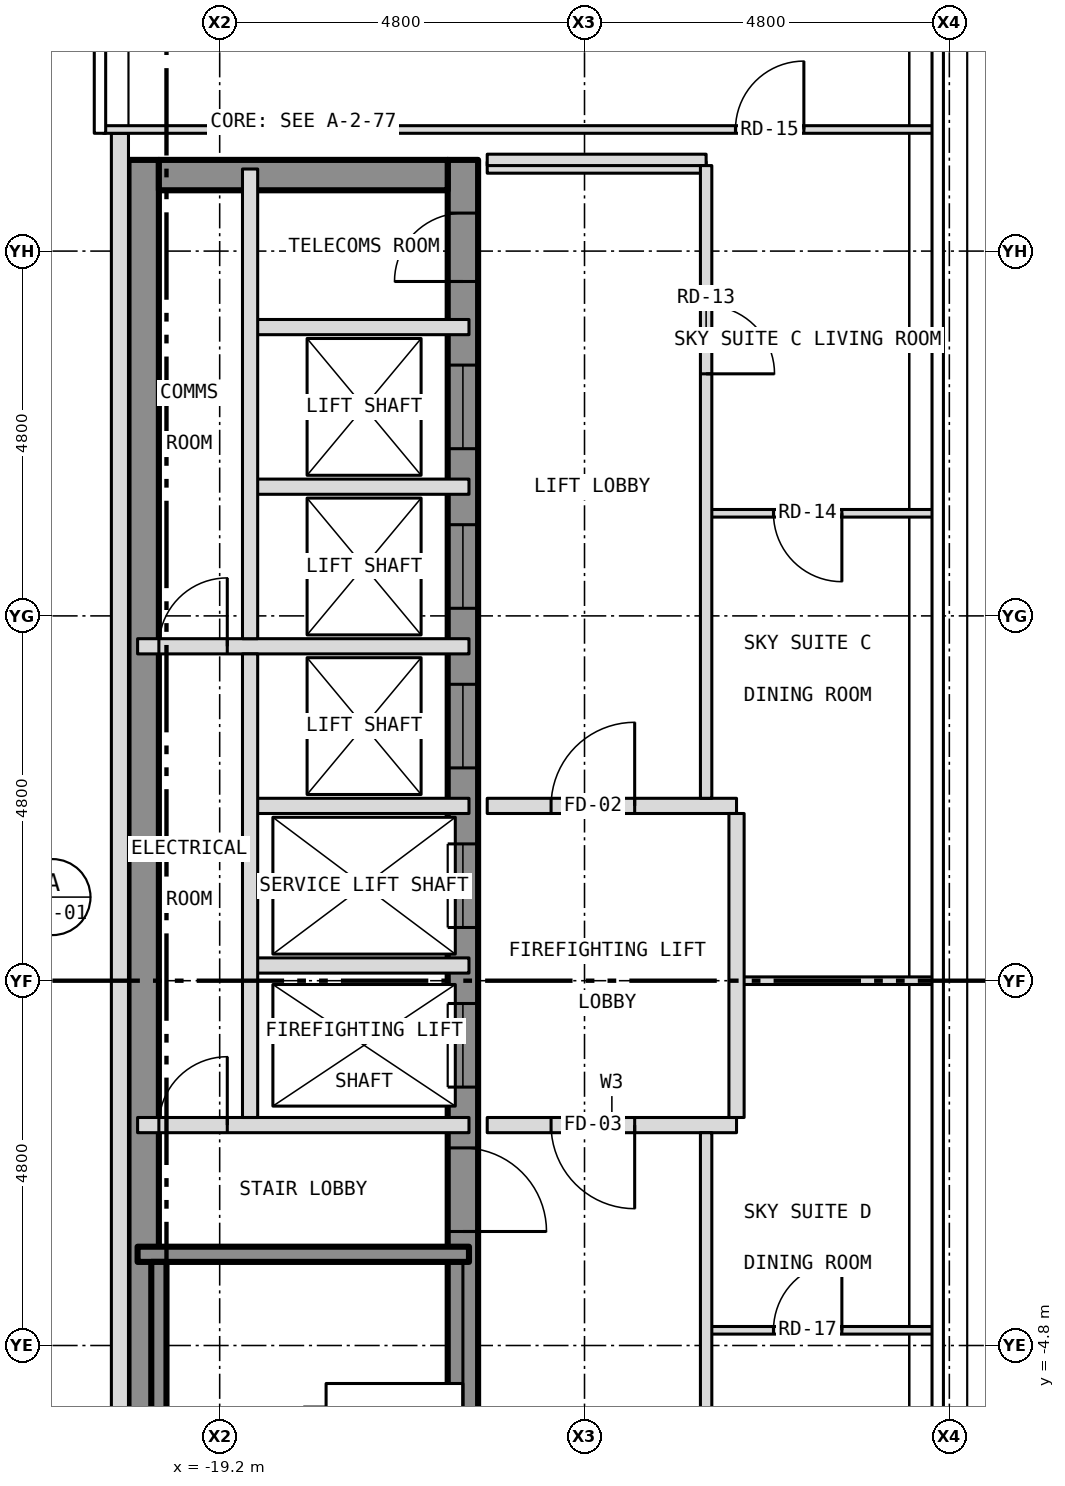
"""IFC4 building model, lengths in metres.
Left out: names, types, materials, properties, quantities, classifications, styles, units other than length and angle.
Written with IfcOpenShell. Run it as: python <this file> out.ifc"""

import sys

from ifc_helpers import new_model, si_unit, direction, frame, frame_2d, origin, place, context, subcontext, project, spatial, rectangle, extrude, element, fill, save


model = new_model("IFC4")
c1 = context("Model", 3, precision=1e-05, world=origin(), true_north=direction((0.0, 1.0)))
c2 = subcontext(c1, "Body", "Model", "MODEL_VIEW")
j1 = project(units=[si_unit("LENGTHUNIT", "METRE"), si_unit("PLANEANGLEUNIT", "RADIAN")], contexts=[c1])
p1 = place(None, origin())
s1 = spatial("IfcSite", under=j1, at=p1, CompositionType="ELEMENT")
p2 = place(p1, origin())
s2 = spatial("IfcBuilding", under=s1, at=p2, CompositionType="ELEMENT")
p3 = place(p2, frame((0.0, 0.0, 279.5)))
s3 = spatial("IfcBuildingStorey", under=s2, at=p3, CompositionType="ELEMENT", Elevation=279.5)
p4 = place(p3, frame((-16.0, -10.8, 0.0), z_axis=(0.0, 0.0, 1.0), x_axis=(0.0, 1.0, 0.0)))
e1 = element("IfcWall", 1, at=p4, inside=s3, PredefinedType="SHEAR", context=c2, shape_type="SweptSolid", body=[
    extrude(rectangle(XDim=21.6, YDim=0.4, at=frame_2d((10.8, 0.0))), origin(), (0.0, 0.0, 1.0), 3.25),
])
p5 = place(p4, frame((9.4, 0.0, 0.0)))
e2 = element("IfcOpeningElement", 2, at=p5, cuts=e1, PredefinedType="OPENING", context=c2, shape_type="SweptSolid", body=[
    extrude(rectangle(XDim=1.1, YDim=2.1, at=frame_2d((0.55, 1.05))), frame((0.0, 0.212, 0.0), z_axis=(0.0, -1.0, 0.0), x_axis=(1.0, 0.0, 0.0)), (0.0, 0.0, 1.0), 0.424),
])
p6 = place(p4, frame((11.5, 0.0, 0.0)))
e3 = element("IfcOpeningElement", 3, at=p6, cuts=e1, PredefinedType="OPENING", context=c2, shape_type="SweptSolid", body=[
    extrude(rectangle(XDim=1.1, YDim=2.1, at=frame_2d((0.55, 1.05))), frame((0.0, 0.212, 0.0), z_axis=(0.0, -1.0, 0.0), x_axis=(1.0, 0.0, 0.0)), (0.0, 0.0, 1.0), 0.424),
])
p7 = place(p4, frame((13.6, 0.0, 0.0)))
e4 = element("IfcOpeningElement", 4, at=p7, cuts=e1, PredefinedType="OPENING", context=c2, shape_type="SweptSolid", body=[
    extrude(rectangle(XDim=1.1, YDim=2.1, at=frame_2d((0.55, 1.05))), frame((0.0, 0.212, 0.0), z_axis=(0.0, -1.0, 0.0), x_axis=(1.0, 0.0, 0.0)), (0.0, 0.0, 1.0), 0.424),
])
p8 = place(p4, frame((15.7, 0.0, 0.0)))
e5 = element("IfcOpeningElement", 5, at=p8, cuts=e1, PredefinedType="OPENING", context=c2, shape_type="SweptSolid", body=[
    extrude(rectangle(XDim=1.1, YDim=2.1, at=frame_2d((0.55, 1.05))), frame((0.0, 0.212, 0.0), z_axis=(0.0, -1.0, 0.0), x_axis=(1.0, 0.0, 0.0)), (0.0, 0.0, 1.0), 0.424),
])
p9 = place(p4, frame((17.8, 0.0, 0.0)))
e6 = element("IfcOpeningElement", 6, at=p9, cuts=e1, PredefinedType="OPENING", context=c2, shape_type="SweptSolid", body=[
    extrude(rectangle(XDim=1.1, YDim=2.1, at=frame_2d((0.55, 1.05))), frame((0.0, 0.212, 0.0), z_axis=(0.0, -1.0, 0.0), x_axis=(1.0, 0.0, 0.0)), (0.0, 0.0, 1.0), 0.424),
])
p10 = place(p4, frame((0.458, 0.0, 0.0)))
e7 = element("IfcOpeningElement", 7, at=p10, cuts=e1, PredefinedType="OPENING", context=c2, shape_type="SweptSolid", body=[
    extrude(rectangle(XDim=1.1, YDim=2.1, at=frame_2d((0.55, 1.05))), frame((0.0, 0.212, 0.0), z_axis=(0.0, -1.0, 0.0), x_axis=(1.0, 0.0, 0.0)), (0.0, 0.0, 1.0), 0.424),
])
p11 = place(p4, frame((7.5, 0.0, 0.0)))
e8 = element("IfcOpeningElement", 8, at=p11, cuts=e1, PredefinedType="OPENING", context=c2, shape_type="SweptSolid", body=[
    extrude(rectangle(XDim=1.1, YDim=2.1, at=frame_2d((0.55, 1.05))), frame((0.0, 0.212, 0.0), z_axis=(0.0, -1.0, 0.0), x_axis=(1.0, 0.0, 0.0)), (0.0, 0.0, 1.0), 0.424),
])
p12 = place(p4, frame((20.0, 0.0, 0.0)))
e9 = element("IfcOpeningElement", 9, at=p12, cuts=e1, PredefinedType="OPENING", context=c2, shape_type="SweptSolid", body=[
    extrude(rectangle(XDim=0.9, YDim=2.1, at=frame_2d((0.45, 1.05))), frame((0.0, 0.212, 0.0), z_axis=(0.0, -1.0, 0.0), x_axis=(1.0, 0.0, 0.0)), (0.0, 0.0, 1.0), 0.424),
])
p13 = place(p3, frame((-20.2, -10.8, 0.0), z_axis=(0.0, 0.0, 1.0), x_axis=(0.0, 1.0, 0.0)))
e10 = element("IfcWall", 10, at=p13, inside=s3, PredefinedType="SHEAR", context=c2, shape_type="SweptSolid", body=[
    extrude(rectangle(XDim=21.6, YDim=0.4, at=frame_2d((10.8, 0.0))), origin(), (0.0, 0.0, 1.0), 3.25),
])
p14 = place(p3, frame((-20.0, 10.6, 0.0), z_axis=(0.0, 0.0, 1.0), x_axis=(1.0, 0.0, 0.0)))
e11 = element("IfcWall", 11, at=p14, inside=s3, PredefinedType="SHEAR", context=c2, shape_type="SweptSolid", body=[
    extrude(rectangle(XDim=3.8, YDim=0.4, at=frame_2d((1.9, 0.0))), origin(), (0.0, 0.0, 1.0), 3.25),
])
p15 = place(p3, frame((-20.512, 11.15, 0.0), z_axis=(0.0, 0.0, 1.0), x_axis=(0.0, -1.0, 0.0)))
e12 = element("IfcWall", 12, at=p15, inside=s3, PredefinedType="SOLIDWALL", context=c2, shape_type="SweptSolid", body=[
    extrude(rectangle(XDim=22.3, YDim=0.225, at=frame_2d((11.15, 0.0))), origin(), (0.0, 0.0, 1.0), 3.5),
])
p16 = place(p15, frame((18.4, 0.0, 1.0)))
e13 = element("IfcOpeningElement", 13, at=p16, cuts=e12, PredefinedType="OPENING", context=c2, shape_type="SweptSolid", body=[
    extrude(rectangle(XDim=0.6, YDim=1.5, at=frame_2d((0.3, 0.75))), frame((0.0, 0.125, 0.0), z_axis=(0.0, -1.0, 0.0), x_axis=(1.0, 0.0, 0.0)), (0.0, 0.0, 1.0), 0.249),
])
p17 = place(p3, frame((-12.8, -4.6, 0.0), z_axis=(0.0, 0.0, 1.0), x_axis=(1.0, 0.0, 0.0)))
e14 = element("IfcWall", 14, at=p17, inside=s3, PredefinedType="PARTITIONING", context=c2, shape_type="SweptSolid", body=[
    extrude(rectangle(XDim=3.002, YDim=0.1, at=frame_2d((1.501, 0.0))), origin(), (0.0, 0.0, 1.0), 3.35),
])
p18 = place(p17, frame((0.886, 0.0, 0.0)))
e15 = element("IfcOpeningElement", 15, at=p18, cuts=e14, PredefinedType="OPENING", context=c2, shape_type="SweptSolid", body=[
    extrude(rectangle(XDim=0.9, YDim=2.1, at=frame_2d((0.45, 1.05))), frame((0.0, 0.062, 0.0), z_axis=(0.0, -1.0, 0.0), x_axis=(1.0, 0.0, 0.0)), (0.0, 0.0, 1.0), 0.124),
])
p19 = place(p3, frame((-20.28, -3.6, 0.0), z_axis=(0.0, 0.0, 1.0), x_axis=(1.0, 0.0, 0.0)))
e16 = element("IfcWall", 16, at=p19, inside=s3, PredefinedType="SHEAR", context=c2, shape_type="SweptSolid", body=[
    extrude(rectangle(XDim=4.36, YDim=0.2, at=frame_2d((2.18, 0.0))), origin(), (0.0, 0.0, 1.0), 3.25),
])
p20 = place(p3, frame((-20.28, -1.9, 0.0), z_axis=(0.0, 0.0, 1.0), x_axis=(1.0, 0.0, 0.0)))
e17 = element("IfcWall", 17, at=p20, inside=s3, PredefinedType="PARTITIONING", context=c2, shape_type="SweptSolid", body=[
    extrude(rectangle(XDim=4.36, YDim=0.2, at=frame_2d((2.18, 0.0))), origin(), (0.0, 0.0, 1.0), 3.25),
])
p21 = place(p20, frame((0.28, 0.0, 0.0)))
e18 = element("IfcOpeningElement", 18, at=p21, cuts=e17, PredefinedType="OPENING", context=c2, shape_type="SweptSolid", body=[
    extrude(rectangle(XDim=0.9, YDim=2.1, at=frame_2d((0.45, 1.05))), frame((0.0, 0.112, 0.0), z_axis=(0.0, -1.0, 0.0), x_axis=(1.0, 0.0, 0.0)), (0.0, 0.0, 1.0), 0.224),
])
p22 = place(p3, frame((-15.68, -1.9, 0.0), z_axis=(0.0, 0.0, 1.0), x_axis=(1.0, 0.0, 0.0)))
e19 = element("IfcWall", 19, at=p22, inside=s3, PredefinedType="PARTITIONING", context=c2, shape_type="SweptSolid", body=[
    extrude(rectangle(XDim=3.28, YDim=0.2, at=frame_2d((1.64, 0.0))), origin(), (0.0, 0.0, 1.0), 3.35),
])
p23 = place(p22, frame((0.84, 0.0, 0.0)))
e20 = element("IfcOpeningElement", 20, at=p23, cuts=e19, PredefinedType="OPENING", context=c2, shape_type="SweptSolid", body=[
    extrude(rectangle(XDim=1.1, YDim=2.1, at=frame_2d((0.55, 1.05))), frame((0.0, 0.112, 0.0), z_axis=(0.0, -1.0, 0.0), x_axis=(1.0, 0.0, 0.0)), (0.0, 0.0, 1.0), 0.224),
])
p24 = place(p3, frame((-12.4, 0.0, 0.0), z_axis=(0.0, 0.0, 1.0), x_axis=(1.0, 0.0, 0.0)))
e21 = element("IfcWall", 21, at=p24, inside=s3, PredefinedType="PARTITIONING", context=c2, shape_type="SweptSolid", body=[
    extrude(rectangle(XDim=2.602, YDim=0.1, at=frame_2d((1.301, 0.0))), origin(), (0.0, 0.0, 1.0), 2.728),
])
for number, where, z_axis, x_axis in (
    (22, (-18.8, 0.2, 0.0), (0.0, 0.0, 1.0), (1.0, 0.0, 0.0)),
    (23, (-18.8, 2.3, 0.0), (0.0, 0.0, 1.0), (1.0, 0.0, 0.0)),
):
    element("IfcWall", number, at=place(p3, frame(where, z_axis=z_axis, x_axis=x_axis)), inside=s3, PredefinedType="PARTITIONING", context=c2, shape_type="SweptSolid", body=[
        extrude(rectangle(XDim=2.88, YDim=0.2, at=frame_2d((1.44, 0.0))), origin(), (0.0, 0.0, 1.0), 3.25),
    ])
p25 = place(p3, frame((-15.68, 2.3, 0.0), z_axis=(0.0, 0.0, 1.0), x_axis=(1.0, 0.0, 0.0)))
e24 = element("IfcWall", 24, at=p25, inside=s3, PredefinedType="PARTITIONING", context=c2, shape_type="SweptSolid", body=[
    extrude(rectangle(XDim=3.28, YDim=0.2, at=frame_2d((1.64, 0.0))), origin(), (0.0, 0.0, 1.0), 3.35),
])
p26 = place(p25, frame((0.84, 0.0, 0.0)))
e25 = element("IfcOpeningElement", 25, at=p26, cuts=e24, PredefinedType="OPENING", context=c2, shape_type="SweptSolid", body=[
    extrude(rectangle(XDim=1.1, YDim=2.1, at=frame_2d((0.55, 1.05))), frame((0.0, 0.112, 0.0), z_axis=(0.0, -1.0, 0.0), x_axis=(1.0, 0.0, 0.0)), (0.0, 0.0, 1.0), 0.224),
])
p27 = place(p3, frame((-20.28, 4.4, 0.0), z_axis=(0.0, 0.0, 1.0), x_axis=(1.0, 0.0, 0.0)))
e26 = element("IfcWall", 26, at=p27, inside=s3, PredefinedType="PARTITIONING", context=c2, shape_type="SweptSolid", body=[
    extrude(rectangle(XDim=4.36, YDim=0.2, at=frame_2d((2.18, 0.0))), origin(), (0.0, 0.0, 1.0), 3.25),
])
p28 = place(p27, frame((0.28, 0.0, 0.0)))
e27 = element("IfcOpeningElement", 27, at=p28, cuts=e26, PredefinedType="OPENING", context=c2, shape_type="SweptSolid", body=[
    extrude(rectangle(XDim=0.9, YDim=2.1, at=frame_2d((0.45, 1.05))), frame((0.0, 0.112, 0.0), z_axis=(0.0, -1.0, 0.0), x_axis=(1.0, 0.0, 0.0)), (0.0, 0.0, 1.0), 0.224),
])
p29 = place(p3, frame((-12.8, 6.15, 0.0), z_axis=(0.0, 0.0, 1.0), x_axis=(1.0, 0.0, 0.0)))
e28 = element("IfcWall", 28, at=p29, inside=s3, PredefinedType="PARTITIONING", context=c2, shape_type="SweptSolid", body=[
    extrude(rectangle(XDim=3.002, YDim=0.1, at=frame_2d((1.501, 0.0))), origin(), (0.0, 0.0, 1.0), 3.35),
])
p30 = place(p29, frame((0.886, 0.0, 0.0)))
e29 = element("IfcOpeningElement", 29, at=p30, cuts=e28, PredefinedType="OPENING", context=c2, shape_type="SweptSolid", body=[
    extrude(rectangle(XDim=0.9, YDim=2.1, at=frame_2d((0.45, 1.05))), frame((0.0, 0.062, 0.0), z_axis=(0.0, -1.0, 0.0), x_axis=(1.0, 0.0, 0.0)), (0.0, 0.0, 1.0), 0.124),
])
for number, where, z_axis, x_axis in (
    (30, (-18.8, 6.5, 0.0), (0.0, 0.0, 1.0), (1.0, 0.0, 0.0)),
    (31, (-18.8, 8.6, 0.0), (0.0, 0.0, 1.0), (1.0, 0.0, 0.0)),
):
    element("IfcWall", number, at=place(p3, frame(where, z_axis=z_axis, x_axis=x_axis)), inside=s3, PredefinedType="PARTITIONING", context=c2, shape_type="SweptSolid", body=[
        extrude(rectangle(XDim=2.88, YDim=0.2, at=frame_2d((1.44, 0.0))), origin(), (0.0, 0.0, 1.0), 3.25),
    ])
for number, where, z_axis, x_axis in (
    (32, (-15.68, 10.7, 0.0), (0.0, 0.0, 1.0), (1.0, 0.0, 0.0)),
    (33, (-15.68, 10.8, 0.0), (0.0, 0.0, 1.0), (1.0, 0.0, 0.0)),
):
    element("IfcWall", number, at=place(p3, frame(where, z_axis=z_axis, x_axis=x_axis)), inside=s3, PredefinedType="PARTITIONING", context=c2, shape_type="SweptSolid", body=[
        extrude(rectangle(XDim=2.88, YDim=0.15, at=frame_2d((1.44, 0.0))), origin(), (0.0, 0.0, 1.0), 3.35),
    ])
p31 = place(p3, frame((-20.73, 11.2, 0.0), z_axis=(0.0, 0.0, 1.0), x_axis=(1.0, 0.0, 0.0)))
e34 = element("IfcWall", 34, at=p31, inside=s3, PredefinedType="PARTITIONING", context=c2, shape_type="SweptSolid", body=[
    extrude(rectangle(XDim=10.932, YDim=0.1, at=frame_2d((5.466, 0.0))), origin(), (0.0, 0.0, 1.0), 3.35),
])
p32 = place(p31, frame((8.316, 0.0, 0.0)))
e35 = element("IfcOpeningElement", 35, at=p32, cuts=e34, PredefinedType="OPENING", context=c2, shape_type="SweptSolid", body=[
    extrude(rectangle(XDim=0.9, YDim=2.1, at=frame_2d((0.45, 1.05))), frame((0.0, 0.062, 0.0), z_axis=(0.0, -1.0, 0.0), x_axis=(1.0, 0.0, 0.0)), (0.0, 0.0, 1.0), 0.124),
])
p33 = place(p3, frame((-20.0, -10.68, 0.0), z_axis=(0.0, 0.0, 1.0), x_axis=(0.0, 1.0, 0.0)))
e36 = element("IfcWall", 36, at=p33, inside=s3, PredefinedType="SHEAR", context=c2, shape_type="SweptSolid", body=[
    extrude(rectangle(XDim=6.98, YDim=0.2, at=frame_2d((3.49, 0.0))), origin(), (0.0, 0.0, 1.0), 3.25),
])
p34 = place(p3, frame((-18.8, -1.8, 0.0), z_axis=(0.0, 0.0, 1.0), x_axis=(0.0, 1.0, 0.0)))
e37 = element("IfcWall", 37, at=p34, inside=s3, PredefinedType="PARTITIONING", context=c2, shape_type="SweptSolid", body=[
    extrude(rectangle(XDim=6.1, YDim=0.2, at=frame_2d((3.05, 0.0))), origin(), (0.0, 0.0, 1.0), 3.25),
])
p35 = place(p3, frame((-18.8, 4.5, 0.0), z_axis=(0.0, 0.0, 1.0), x_axis=(0.0, 1.0, 0.0)))
e38 = element("IfcWall", 38, at=p35, inside=s3, PredefinedType="PARTITIONING", context=c2, shape_type="SweptSolid", body=[
    extrude(rectangle(XDim=6.18, YDim=0.2, at=frame_2d((3.09, 0.0))), origin(), (0.0, 0.0, 1.0), 3.25),
])
p36 = place(p3, frame((-12.8, -10.725, 0.0), z_axis=(0.0, 0.0, 1.0), x_axis=(0.0, 1.0, 0.0)))
e39 = element("IfcWall", 39, at=p36, inside=s3, PredefinedType="PARTITIONING", context=c2, shape_type="SweptSolid", body=[
    extrude(rectangle(XDim=8.725, YDim=0.15, at=frame_2d((4.363, 0.0))), origin(), (0.0, 0.0, 1.0), 3.35),
])
p37 = place(p36, frame((2.88, 0.0, 0.0)))
e40 = element("IfcOpeningElement", 40, at=p37, cuts=e39, PredefinedType="OPENING", context=c2, shape_type="SweptSolid", body=[
    extrude(rectangle(XDim=0.9, YDim=2.1, at=frame_2d((0.45, 1.05))), frame((0.0, 0.087, 0.0), z_axis=(0.0, -1.0, 0.0), x_axis=(1.0, 0.0, 0.0)), (0.0, 0.0, 1.0), 0.174),
])
p38 = place(p3, frame((-12.8, 2.4, 0.0), z_axis=(0.0, 0.0, 1.0), x_axis=(0.0, 1.0, 0.0)))
e41 = element("IfcWall", 41, at=p38, inside=s3, PredefinedType="PARTITIONING", context=c2, shape_type="SweptSolid", body=[
    extrude(rectangle(XDim=8.325, YDim=0.15, at=frame_2d((4.163, 0.0))), origin(), (0.0, 0.0, 1.0), 3.35),
])
p39 = place(p38, frame((5.585, 0.0, 0.0)))
e42 = element("IfcOpeningElement", 42, at=p39, cuts=e41, PredefinedType="OPENING", context=c2, shape_type="SweptSolid", body=[
    extrude(rectangle(XDim=0.9, YDim=2.1, at=frame_2d((0.45, 1.05))), frame((0.0, 0.087, 0.0), z_axis=(0.0, -1.0, 0.0), x_axis=(1.0, 0.0, 0.0)), (0.0, 0.0, 1.0), 0.174),
])
p40 = place(p3, frame((-12.4, -1.8, 0.0), z_axis=(0.0, 0.0, 1.0), x_axis=(0.0, 1.0, 0.0)))
e43 = element("IfcWall", 43, at=p40, inside=s3, PredefinedType="PARTITIONING", context=c2, shape_type="SweptSolid", body=[
    extrude(rectangle(XDim=4.0, YDim=0.2, at=frame_2d((2.0, 0.0))), origin(), (0.0, 0.0, 1.0), 3.35),
])
p41 = place(p5, origin())
e44 = element("IfcDoor", 44, at=p41, inside=s3, OperationType="SLIDING_TO_LEFT", PredefinedType="DOOR", context=c2, shape_type="SweptSolid", body=[
    extrude(rectangle(XDim=1.1, YDim=2.1, at=frame_2d((0.55, 1.05))), frame((0.0, 0.025, 0.0), z_axis=(0.0, -1.0, 0.0), x_axis=(1.0, 0.0, 0.0)), (0.0, 0.0, 1.0), 0.05),
])
fill(e2, e44)
p42 = place(p6, origin())
e45 = element("IfcDoor", 45, at=p42, inside=s3, OperationType="SLIDING_TO_LEFT", PredefinedType="DOOR", context=c2, shape_type="SweptSolid", body=[
    extrude(rectangle(XDim=1.1, YDim=2.1, at=frame_2d((0.55, 1.05))), frame((0.0, 0.025, 0.0), z_axis=(0.0, -1.0, 0.0), x_axis=(1.0, 0.0, 0.0)), (0.0, 0.0, 1.0), 0.05),
])
fill(e3, e45)
p43 = place(p7, origin())
e46 = element("IfcDoor", 46, at=p43, inside=s3, OperationType="SLIDING_TO_LEFT", PredefinedType="DOOR", context=c2, shape_type="SweptSolid", body=[
    extrude(rectangle(XDim=1.1, YDim=2.1, at=frame_2d((0.55, 1.05))), frame((0.0, 0.025, 0.0), z_axis=(0.0, -1.0, 0.0), x_axis=(1.0, 0.0, 0.0)), (0.0, 0.0, 1.0), 0.05),
])
fill(e4, e46)
p44 = place(p8, origin())
e47 = element("IfcDoor", 47, at=p44, inside=s3, OperationType="SLIDING_TO_LEFT", PredefinedType="DOOR", context=c2, shape_type="SweptSolid", body=[
    extrude(rectangle(XDim=1.1, YDim=2.1, at=frame_2d((0.55, 1.05))), frame((0.0, 0.025, 0.0), z_axis=(0.0, -1.0, 0.0), x_axis=(1.0, 0.0, 0.0)), (0.0, 0.0, 1.0), 0.05),
])
fill(e5, e47)
p45 = place(p9, origin())
e48 = element("IfcDoor", 48, at=p45, inside=s3, OperationType="SLIDING_TO_LEFT", PredefinedType="DOOR", context=c2, shape_type="SweptSolid", body=[
    extrude(rectangle(XDim=1.1, YDim=2.1, at=frame_2d((0.55, 1.05))), frame((0.0, 0.025, 0.0), z_axis=(0.0, -1.0, 0.0), x_axis=(1.0, 0.0, 0.0)), (0.0, 0.0, 1.0), 0.05),
])
fill(e6, e48)
p46 = place(p11, origin())
e49 = element("IfcDoor", 49, at=p46, inside=s3, OperationType="SINGLE_SWING_LEFT", PredefinedType="DOOR", context=c2, shape_type="SweptSolid", body=[
    extrude(rectangle(XDim=1.1, YDim=2.1, at=frame_2d((0.55, 1.05))), frame((0.0, 0.025, 0.0), z_axis=(0.0, -1.0, 0.0), x_axis=(1.0, 0.0, 0.0)), (0.0, 0.0, 1.0), 0.05),
])
fill(e8, e49)
p47 = place(p12, origin())
e50 = element("IfcDoor", 50, at=p47, inside=s3, OperationType="SINGLE_SWING_LEFT", PredefinedType="DOOR", context=c2, shape_type="SweptSolid", body=[
    extrude(rectangle(XDim=0.9, YDim=2.1, at=frame_2d((0.45, 1.05))), frame((0.0, 0.025, 0.0), z_axis=(0.0, -1.0, 0.0), x_axis=(1.0, 0.0, 0.0)), (0.0, 0.0, 1.0), 0.05),
])
fill(e9, e50)
p48 = place(p21, origin())
e51 = element("IfcDoor", 51, at=p48, inside=s3, OperationType="SINGLE_SWING_RIGHT", PredefinedType="DOOR", context=c2, shape_type="SweptSolid", body=[
    extrude(rectangle(XDim=0.9, YDim=2.1, at=frame_2d((0.45, 1.05))), frame((0.0, 0.025, 0.0), z_axis=(0.0, -1.0, 0.0), x_axis=(1.0, 0.0, 0.0)), (0.0, 0.0, 1.0), 0.05),
])
fill(e18, e51)
p49 = place(p28, origin())
e52 = element("IfcDoor", 52, at=p49, inside=s3, OperationType="SINGLE_SWING_RIGHT", PredefinedType="DOOR", context=c2, shape_type="SweptSolid", body=[
    extrude(rectangle(XDim=0.9, YDim=2.1, at=frame_2d((0.45, 1.05))), frame((0.0, 0.025, 0.0), z_axis=(0.0, -1.0, 0.0), x_axis=(1.0, 0.0, 0.0)), (0.0, 0.0, 1.0), 0.05),
])
fill(e27, e52)
p50 = place(p26, origin())
e53 = element("IfcDoor", 53, at=p50, inside=s3, OperationType="SINGLE_SWING_RIGHT", PredefinedType="DOOR", context=c2, shape_type="SweptSolid", body=[
    extrude(rectangle(XDim=1.1, YDim=2.1, at=frame_2d((0.55, 1.05))), frame((0.0, 0.025, 0.0), z_axis=(0.0, -1.0, 0.0), x_axis=(1.0, 0.0, 0.0)), (0.0, 0.0, 1.0), 0.05),
])
fill(e25, e53)
p51 = place(p23, origin())
e54 = element("IfcDoor", 54, at=p51, inside=s3, OperationType="SINGLE_SWING_RIGHT", PredefinedType="DOOR", context=c2, shape_type="SweptSolid", body=[
    extrude(rectangle(XDim=1.1, YDim=2.1, at=frame_2d((0.55, 1.05))), frame((0.0, 0.025, 0.0), z_axis=(0.0, -1.0, 0.0), x_axis=(1.0, 0.0, 0.0)), (0.0, 0.0, 1.0), 0.05),
])
fill(e20, e54)
p52 = place(p39, origin())
e55 = element("IfcDoor", 55, at=p52, inside=s3, OperationType="SINGLE_SWING_LEFT", PredefinedType="DOOR", context=c2, shape_type="SweptSolid", body=[
    extrude(rectangle(XDim=0.9, YDim=2.1, at=frame_2d((0.45, 1.05))), frame((0.0, 0.025, 0.0), z_axis=(0.0, -1.0, 0.0), x_axis=(1.0, 0.0, 0.0)), (0.0, 0.0, 1.0), 0.05),
])
fill(e42, e55)
p53 = place(p30, origin())
e56 = element("IfcDoor", 56, at=p53, inside=s3, OperationType="SINGLE_SWING_RIGHT", PredefinedType="DOOR", context=c2, shape_type="SweptSolid", body=[
    extrude(rectangle(XDim=0.9, YDim=2.1, at=frame_2d((0.45, 1.05))), frame((0.0, 0.025, 0.0), z_axis=(0.0, -1.0, 0.0), x_axis=(1.0, 0.0, 0.0)), (0.0, 0.0, 1.0), 0.05),
])
fill(e29, e56)
p54 = place(p32, origin())
e57 = element("IfcDoor", 57, at=p54, inside=s3, OperationType="SINGLE_SWING_RIGHT", PredefinedType="DOOR", context=c2, shape_type="SweptSolid", body=[
    extrude(rectangle(XDim=0.9, YDim=2.1, at=frame_2d((0.45, 1.05))), frame((0.0, 0.025, 0.0), z_axis=(0.0, -1.0, 0.0), x_axis=(1.0, 0.0, 0.0)), (0.0, 0.0, 1.0), 0.05),
])
fill(e35, e57)
p55 = place(p18, origin())
e58 = element("IfcDoor", 58, at=p55, inside=s3, OperationType="SINGLE_SWING_RIGHT", PredefinedType="DOOR", context=c2, shape_type="SweptSolid", body=[
    extrude(rectangle(XDim=0.9, YDim=2.1, at=frame_2d((0.45, 1.05))), frame((0.0, 0.025, 0.0), z_axis=(0.0, -1.0, 0.0), x_axis=(1.0, 0.0, 0.0)), (0.0, 0.0, 1.0), 0.05),
])
fill(e15, e58)
save(model, sys.argv[1])
